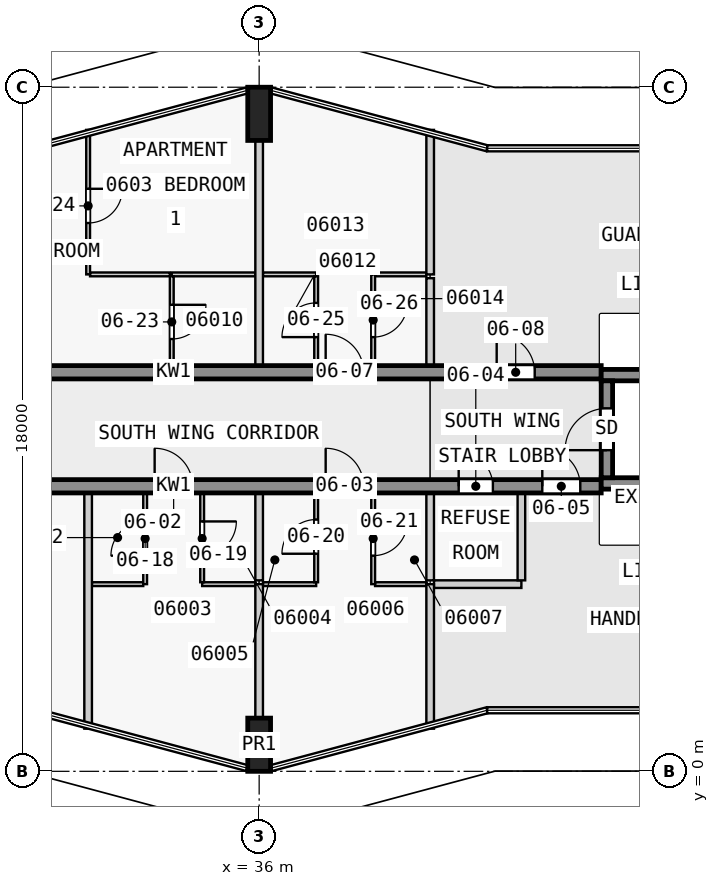
"""IFC4 building model, lengths in metres.
Left out: names, types, materials, properties, quantities, classifications, styles, units other than length and angle.
Written with IfcOpenShell. Run it as: python <this file> out.ifc"""

import sys

from ifc_helpers import new_model, si_unit, direction, frame, frame_2d, origin, origin_2d, place, context, subcontext, project, spatial, rectangle, extrude, element, fill, save


model = new_model("IFC4")
c1 = context("Model", 3, precision=1e-05, world=origin(), true_north=direction((0.0, 1.0)))
c2 = subcontext(c1, "Body", "Model", "MODEL_VIEW")
j1 = project(units=[si_unit("LENGTHUNIT", "METRE"), si_unit("PLANEANGLEUNIT", "RADIAN")], contexts=[c1])
p1 = place(None, origin())
s1 = spatial("IfcSite", under=j1, at=p1, CompositionType="ELEMENT")
p2 = place(p1, origin())
s2 = spatial("IfcBuilding", under=s1, at=p2, CompositionType="ELEMENT")
p3 = place(p2, frame((0.0, 0.0, 30.3)))
s3 = spatial("IfcBuildingStorey", under=s2, at=p3, CompositionType="ELEMENT", Elevation=30.3)
for number, where, z_axis, x_axis in (
    (1, (36.0, 0.7, 0.0), (0.0, 0.0, 1.0), (1.0, 0.0, 0.0)),
    (2, (36.0, 17.3, 0.0), (0.0, 0.0, 1.0), (1.0, 0.0, 0.0)),
):
    element("IfcColumn", number, at=place(p3, frame(where, z_axis=z_axis, x_axis=x_axis)), inside=s3, PredefinedType="COLUMN", context=c2, shape_type="SweptSolid", body=[
        extrude(rectangle(XDim=0.6, YDim=1.4, at=origin_2d()), origin(), (0.0, 0.0, 1.0), 3.5),
    ])
p4 = place(p3, frame((45.15, 7.725, 0.0), z_axis=(0.0, 0.0, 1.0), x_axis=(0.0, 1.0, 0.0)))
e3 = element("IfcWall", 3, at=p4, inside=s3, PredefinedType="SHEAR", context=c2, shape_type="SweptSolid", body=[
    extrude(rectangle(XDim=2.55, YDim=0.3, at=frame_2d((1.275, 0.0))), origin(), (0.0, 0.0, 1.0), 3.5),
])
p5 = place(p4, frame((0.725, 0.0, 0.0)))
e4 = element("IfcOpeningElement", 4, at=p5, cuts=e3, PredefinedType="OPENING", context=c2, shape_type="SweptSolid", body=[
    extrude(rectangle(XDim=1.1, YDim=2.1, at=frame_2d((0.55, 1.05))), frame((0.0, 0.16, 0.0), z_axis=(0.0, -1.0, 0.0), x_axis=(1.0, 0.0, 0.0)), (0.0, 0.0, 1.0), 0.32),
])
for number, where, z_axis, x_axis in (
    (5, (45.0, 7.575, 0.0), (0.0, 0.0, 1.0), (1.0, 0.0, 0.0)),
    (6, (45.0, 10.425, 0.0), (0.0, 0.0, 1.0), (1.0, 0.0, 0.0)),
):
    element("IfcWall", number, at=place(p3, frame(where, z_axis=z_axis, x_axis=x_axis)), inside=s3, PredefinedType="SHEAR", context=c2, shape_type="SweptSolid", body=[
        extrude(rectangle(XDim=7.2, YDim=0.3, at=frame_2d((3.6, 0.0))), origin(), (0.0, 0.0, 1.0), 3.5),
    ])
p6 = place(p3, frame((22.5, 7.5, 0.0), z_axis=(0.0, 0.0, 1.0), x_axis=(1.0, 0.0, 0.0)))
e7 = element("IfcWall", 7, at=p6, inside=s3, PredefinedType="SHEAR", context=c2, shape_type="SweptSolid", body=[
    extrude(rectangle(XDim=22.5, YDim=0.35, at=frame_2d((11.25, 0.0))), origin(), (0.0, 0.0, 1.0), 3.25),
])
p7 = place(p6, frame((4.05, 0.0, 0.0)))
e8 = element("IfcOpeningElement", 8, at=p7, cuts=e7, PredefinedType="OPENING", context=c2, shape_type="SweptSolid", body=[
    extrude(rectangle(XDim=1.0, YDim=2.1, at=frame_2d((0.5, 1.05))), frame((0.0, 0.185, 0.0), z_axis=(0.0, -1.0, 0.0), x_axis=(1.0, 0.0, 0.0)), (0.0, 0.0, 1.0), 0.37),
])
p8 = place(p6, frame((10.75, 0.0, 0.0)))
e9 = element("IfcOpeningElement", 9, at=p8, cuts=e7, PredefinedType="OPENING", context=c2, shape_type="SweptSolid", body=[
    extrude(rectangle(XDim=1.0, YDim=2.1, at=frame_2d((0.5, 1.05))), frame((0.0, 0.185, 0.0), z_axis=(0.0, -1.0, 0.0), x_axis=(1.0, 0.0, 0.0)), (0.0, 0.0, 1.0), 0.37),
])
p9 = place(p6, frame((15.25, 0.0, 0.0)))
e10 = element("IfcOpeningElement", 10, at=p9, cuts=e7, PredefinedType="OPENING", context=c2, shape_type="SweptSolid", body=[
    extrude(rectangle(XDim=1.0, YDim=2.1, at=frame_2d((0.5, 1.05))), frame((0.0, 0.185, 0.0), z_axis=(0.0, -1.0, 0.0), x_axis=(1.0, 0.0, 0.0)), (0.0, 0.0, 1.0), 0.37),
])
p10 = place(p6, frame((18.75, 0.0, 0.0)))
e11 = element("IfcOpeningElement", 11, at=p10, cuts=e7, PredefinedType="OPENING", context=c2, shape_type="SweptSolid", body=[
    extrude(rectangle(XDim=0.9, YDim=2.1, at=frame_2d((0.45, 1.05))), frame((0.0, 0.185, 0.0), z_axis=(0.0, -1.0, 0.0), x_axis=(1.0, 0.0, 0.0)), (0.0, 0.0, 1.0), 0.37),
])
p11 = place(p6, frame((20.95, 0.0, 0.0)))
e12 = element("IfcOpeningElement", 12, at=p11, cuts=e7, PredefinedType="OPENING", context=c2, shape_type="SweptSolid", body=[
    extrude(rectangle(XDim=1.0, YDim=2.1, at=frame_2d((0.5, 1.05))), frame((0.0, 0.185, 0.0), z_axis=(0.0, -1.0, 0.0), x_axis=(1.0, 0.0, 0.0)), (0.0, 0.0, 1.0), 0.37),
])
p12 = place(p3, frame((22.5, 10.5, 0.0), z_axis=(0.0, 0.0, 1.0), x_axis=(1.0, 0.0, 0.0)))
e13 = element("IfcWall", 13, at=p12, inside=s3, PredefinedType="SHEAR", context=c2, shape_type="SweptSolid", body=[
    extrude(rectangle(XDim=22.5, YDim=0.35, at=frame_2d((11.25, 0.0))), origin(), (0.0, 0.0, 1.0), 3.25),
])
p13 = place(p12, frame((6.05, 0.0, 0.0)))
e14 = element("IfcOpeningElement", 14, at=p13, cuts=e13, PredefinedType="OPENING", context=c2, shape_type="SweptSolid", body=[
    extrude(rectangle(XDim=1.0, YDim=2.1, at=frame_2d((0.5, 1.05))), frame((0.0, 0.185, 0.0), z_axis=(0.0, -1.0, 0.0), x_axis=(1.0, 0.0, 0.0)), (0.0, 0.0, 1.0), 0.37),
])
p14 = place(p12, frame((15.25, 0.0, 0.0)))
e15 = element("IfcOpeningElement", 15, at=p14, cuts=e13, PredefinedType="OPENING", context=c2, shape_type="SweptSolid", body=[
    extrude(rectangle(XDim=1.0, YDim=2.1, at=frame_2d((0.5, 1.05))), frame((0.0, 0.185, 0.0), z_axis=(0.0, -1.0, 0.0), x_axis=(1.0, 0.0, 0.0)), (0.0, 0.0, 1.0), 0.37),
])
p15 = place(p12, frame((19.75, 0.0, 0.0)))
e16 = element("IfcOpeningElement", 16, at=p15, cuts=e13, PredefinedType="OPENING", context=c2, shape_type="SweptSolid", body=[
    extrude(rectangle(XDim=1.0, YDim=2.1, at=frame_2d((0.5, 1.05))), frame((0.0, 0.185, 0.0), z_axis=(0.0, -1.0, 0.0), x_axis=(1.0, 0.0, 0.0)), (0.0, 0.0, 1.0), 0.37),
])
p16 = place(p3, frame((31.6, 4.925, 0.0), z_axis=(0.0, 0.0, 1.0), x_axis=(1.0, 0.0, 0.0)))
e17 = element("IfcWall", 17, at=p16, inside=s3, PredefinedType="PARTITIONING", context=c2, shape_type="SweptSolid", body=[
    extrude(rectangle(XDim=1.35, YDim=0.1, at=frame_2d((0.675, 0.0))), origin(), (0.0, 0.0, 1.0), 3.25),
])
for number, where, z_axis, x_axis in (
    (18, (34.5, 4.925, 0.0), (0.0, 0.0, 1.0), (1.0, 0.0, 0.0)),
    (19, (36.1, 4.925, 0.0), (0.0, 0.0, 1.0), (1.0, 0.0, 0.0)),
):
    element("IfcWall", number, at=place(p3, frame(where, z_axis=z_axis, x_axis=x_axis)), inside=s3, PredefinedType="PARTITIONING", context=c2, shape_type="SweptSolid", body=[
        extrude(rectangle(XDim=1.4, YDim=0.1, at=frame_2d((0.7, 0.0))), origin(), (0.0, 0.0, 1.0), 3.25),
    ])
p17 = place(p3, frame((39.05, 4.925, 0.0), z_axis=(0.0, 0.0, 1.0), x_axis=(1.0, 0.0, 0.0)))
e20 = element("IfcWall", 20, at=p17, inside=s3, PredefinedType="PARTITIONING", context=c2, shape_type="SweptSolid", body=[
    extrude(rectangle(XDim=1.35, YDim=0.1, at=frame_2d((0.675, 0.0))), origin(), (0.0, 0.0, 1.0), 3.25),
])
p18 = place(p3, frame((40.6, 4.925, 0.0), z_axis=(0.0, 0.0, 1.0), x_axis=(1.0, 0.0, 0.0)))
e21 = element("IfcWall", 21, at=p18, inside=s3, PredefinedType="PARTITIONING", context=c2, shape_type="SweptSolid", body=[
    extrude(rectangle(XDim=2.3, YDim=0.2, at=frame_2d((1.15, 0.0))), origin(), (0.0, 0.0, 1.0), 3.25),
])
p19 = place(p3, frame((35.9, 13.075, 0.0), z_axis=(0.0, 0.0, 1.0), x_axis=(-1.0, 0.0, 0.0)))
e22 = element("IfcWall", 22, at=p19, inside=s3, PredefinedType="PARTITIONING", context=c2, shape_type="SweptSolid", body=[
    extrude(rectangle(XDim=2.2, YDim=0.1, at=frame_2d((1.1, 0.0))), origin(), (0.0, 0.0, 1.0), 3.25),
])
p20 = place(p3, frame((37.5, 13.075, 0.0), z_axis=(0.0, 0.0, 1.0), x_axis=(-1.0, 0.0, 0.0)))
e23 = element("IfcWall", 23, at=p20, inside=s3, PredefinedType="PARTITIONING", context=c2, shape_type="SweptSolid", body=[
    extrude(rectangle(XDim=1.4, YDim=0.1, at=frame_2d((0.7, 0.0))), origin(), (0.0, 0.0, 1.0), 3.25),
])
p21 = place(p3, frame((40.4, 13.075, 0.0), z_axis=(0.0, 0.0, 1.0), x_axis=(-1.0, 0.0, 0.0)))
e24 = element("IfcWall", 24, at=p21, inside=s3, PredefinedType="PARTITIONING", context=c2, shape_type="SweptSolid", body=[
    extrude(rectangle(XDim=1.35, YDim=0.1, at=frame_2d((0.675, 0.0))), origin(), (0.0, 0.0, 1.0), 3.25),
])
p22 = place(p3, frame((31.55, 13.075, 0.0), z_axis=(0.0, 0.0, 1.0), x_axis=(1.0, 0.0, 0.0)))
e25 = element("IfcWall", 25, at=p22, inside=s3, PredefinedType="PARTITIONING", context=c2, shape_type="SweptSolid", body=[
    extrude(rectangle(XDim=2.1, YDim=0.1, at=frame_2d((1.05, 0.0))), origin(), (0.0, 0.0, 1.0), 3.25),
])
p23 = place(p3, frame((31.5, 16.878, 0.0), z_axis=(0.0, 0.0, 1.0), x_axis=(0.0, -1.0, 0.0)))
e26 = element("IfcWall", 26, at=p23, inside=s3, PredefinedType="PARTITIONING", context=c2, shape_type="SweptSolid", body=[
    extrude(rectangle(XDim=3.803, YDim=0.1, at=frame_2d((1.901, 0.0))), origin(), (0.0, 0.0, 1.0), 3.25),
])
p24 = place(p23, frame((1.55, 0.0, 0.0)))
e27 = element("IfcOpeningElement", 27, at=p24, cuts=e26, PredefinedType="OPENING", context=c2, shape_type="SweptSolid", body=[
    extrude(rectangle(XDim=0.9, YDim=2.1, at=frame_2d((0.45, 1.05))), frame((0.0, 0.06, 0.0), z_axis=(0.0, -1.0, 0.0), x_axis=(1.0, 0.0, 0.0)), (0.0, 0.0, 1.0), 0.12),
])
p25 = place(p3, frame((31.5, 1.122, 0.0), z_axis=(0.0, 0.0, 1.0), x_axis=(0.0, 1.0, 0.0)))
e28 = element("IfcWall", 28, at=p25, inside=s3, PredefinedType="PARTITIONING", context=c2, shape_type="SweptSolid", body=[
    extrude(rectangle(XDim=6.203, YDim=0.2, at=frame_2d((3.101, 0.0))), origin(), (0.0, 0.0, 1.0), 3.25),
])
p26 = place(p3, frame((33.0, 4.925, 0.0), z_axis=(0.0, 0.0, 1.0), x_axis=(0.0, 1.0, 0.0)))
e29 = element("IfcWall", 29, at=p26, inside=s3, PredefinedType="PARTITIONING", context=c2, shape_type="SweptSolid", body=[
    extrude(rectangle(XDim=2.4, YDim=0.1, at=frame_2d((1.2, 0.0))), origin(), (0.0, 0.0, 1.0), 3.25),
])
p27 = place(p26, frame((0.75, 0.0, 0.0)))
e30 = element("IfcOpeningElement", 30, at=p27, cuts=e29, PredefinedType="OPENING", context=c2, shape_type="SweptSolid", body=[
    extrude(rectangle(XDim=0.9, YDim=2.1, at=frame_2d((0.45, 1.05))), frame((0.0, 0.06, 0.0), z_axis=(0.0, -1.0, 0.0), x_axis=(1.0, 0.0, 0.0)), (0.0, 0.0, 1.0), 0.12),
])
p28 = place(p3, frame((33.7, 13.025, 0.0), z_axis=(0.0, 0.0, 1.0), x_axis=(0.0, -1.0, 0.0)))
e31 = element("IfcWall", 31, at=p28, inside=s3, PredefinedType="PARTITIONING", context=c2, shape_type="SweptSolid", body=[
    extrude(rectangle(XDim=2.35, YDim=0.1, at=frame_2d((1.175, 0.0))), origin(), (0.0, 0.0, 1.0), 3.25),
])
p29 = place(p28, frame((0.75, 0.0, 0.0)))
e32 = element("IfcOpeningElement", 32, at=p29, cuts=e31, PredefinedType="OPENING", context=c2, shape_type="SweptSolid", body=[
    extrude(rectangle(XDim=0.9, YDim=2.1, at=frame_2d((0.45, 1.05))), frame((0.0, 0.06, 0.0), z_axis=(0.0, -1.0, 0.0), x_axis=(1.0, 0.0, 0.0)), (0.0, 0.0, 1.0), 0.12),
])
p30 = place(p3, frame((34.5, 7.325, 0.0), z_axis=(0.0, 0.0, 1.0), x_axis=(0.0, -1.0, 0.0)))
e33 = element("IfcWall", 33, at=p30, inside=s3, PredefinedType="PARTITIONING", context=c2, shape_type="SweptSolid", body=[
    extrude(rectangle(XDim=2.35, YDim=0.1, at=frame_2d((1.175, 0.0))), origin(), (0.0, 0.0, 1.0), 3.25),
])
p31 = place(p30, frame((0.75, 0.0, 0.0)))
e34 = element("IfcOpeningElement", 34, at=p31, cuts=e33, PredefinedType="OPENING", context=c2, shape_type="SweptSolid", body=[
    extrude(rectangle(XDim=0.9, YDim=2.1, at=frame_2d((0.45, 1.05))), frame((0.0, 0.06, 0.0), z_axis=(0.0, -1.0, 0.0), x_axis=(1.0, 0.0, 0.0)), (0.0, 0.0, 1.0), 0.12),
])
p32 = place(p3, frame((36.0, 4.925, 0.0), z_axis=(0.0, 0.0, 1.0), x_axis=(0.0, -1.0, 0.0)))
e35 = element("IfcWall", 35, at=p32, inside=s3, PredefinedType="PARTITIONING", context=c2, shape_type="SweptSolid", body=[
    extrude(rectangle(XDim=3.525, YDim=0.2, at=frame_2d((1.763, 0.0))), origin(), (0.0, 0.0, 1.0), 3.25),
])
p33 = place(p3, frame((36.0, 5.025, 0.0), z_axis=(0.0, 0.0, 1.0), x_axis=(0.0, 1.0, 0.0)))
e36 = element("IfcWall", 36, at=p33, inside=s3, PredefinedType="PARTITIONING", context=c2, shape_type="SweptSolid", body=[
    extrude(rectangle(XDim=2.3, YDim=0.2, at=frame_2d((1.15, 0.0))), origin(), (0.0, 0.0, 1.0), 3.25),
])
p34 = place(p3, frame((36.0, 10.675, 0.0), z_axis=(0.0, 0.0, 1.0), x_axis=(0.0, 1.0, 0.0)))
e37 = element("IfcWall", 37, at=p34, inside=s3, PredefinedType="PARTITIONING", context=c2, shape_type="SweptSolid", body=[
    extrude(rectangle(XDim=5.925, YDim=0.2, at=frame_2d((2.962, 0.0))), origin(), (0.0, 0.0, 1.0), 3.25),
])
p35 = place(p3, frame((37.5, 4.975, 0.0), z_axis=(0.0, 0.0, 1.0), x_axis=(0.0, 1.0, 0.0)))
e38 = element("IfcWall", 38, at=p35, inside=s3, PredefinedType="PARTITIONING", context=c2, shape_type="SweptSolid", body=[
    extrude(rectangle(XDim=2.35, YDim=0.1, at=frame_2d((1.175, 0.0))), origin(), (0.0, 0.0, 1.0), 3.25),
])
p36 = place(p35, frame((0.75, 0.0, 0.0)))
e39 = element("IfcOpeningElement", 39, at=p36, cuts=e38, PredefinedType="OPENING", context=c2, shape_type="SweptSolid", body=[
    extrude(rectangle(XDim=0.9, YDim=2.1, at=frame_2d((0.45, 1.05))), frame((0.0, 0.06, 0.0), z_axis=(0.0, -1.0, 0.0), x_axis=(1.0, 0.0, 0.0)), (0.0, 0.0, 1.0), 0.12),
])
p37 = place(p3, frame((37.5, 10.675, 0.0), z_axis=(0.0, 0.0, 1.0), x_axis=(0.0, 1.0, 0.0)))
e40 = element("IfcWall", 40, at=p37, inside=s3, PredefinedType="PARTITIONING", context=c2, shape_type="SweptSolid", body=[
    extrude(rectangle(XDim=2.35, YDim=0.1, at=frame_2d((1.175, 0.0))), origin(), (0.0, 0.0, 1.0), 3.25),
])
p38 = place(p37, frame((0.75, 0.0, 0.0)))
e41 = element("IfcOpeningElement", 41, at=p38, cuts=e40, PredefinedType="OPENING", context=c2, shape_type="SweptSolid", body=[
    extrude(rectangle(XDim=0.9, YDim=2.1, at=frame_2d((0.45, 1.05))), frame((0.0, 0.06, 0.0), z_axis=(0.0, -1.0, 0.0), x_axis=(1.0, 0.0, 0.0)), (0.0, 0.0, 1.0), 0.12),
])
p39 = place(p3, frame((39.0, 7.325, 0.0), z_axis=(0.0, 0.0, 1.0), x_axis=(0.0, -1.0, 0.0)))
e42 = element("IfcWall", 42, at=p39, inside=s3, PredefinedType="PARTITIONING", context=c2, shape_type="SweptSolid", body=[
    extrude(rectangle(XDim=2.4, YDim=0.1, at=frame_2d((1.2, 0.0))), origin(), (0.0, 0.0, 1.0), 3.25),
])
p40 = place(p39, frame((0.75, 0.0, 0.0)))
e43 = element("IfcOpeningElement", 43, at=p40, cuts=e42, PredefinedType="OPENING", context=c2, shape_type="SweptSolid", body=[
    extrude(rectangle(XDim=0.9, YDim=2.1, at=frame_2d((0.45, 1.05))), frame((0.0, 0.06, 0.0), z_axis=(0.0, -1.0, 0.0), x_axis=(1.0, 0.0, 0.0)), (0.0, 0.0, 1.0), 0.12),
])
p41 = place(p3, frame((39.0, 13.075, 0.0), z_axis=(0.0, 0.0, 1.0), x_axis=(0.0, -1.0, 0.0)))
e44 = element("IfcWall", 44, at=p41, inside=s3, PredefinedType="PARTITIONING", context=c2, shape_type="SweptSolid", body=[
    extrude(rectangle(XDim=2.4, YDim=0.1, at=frame_2d((1.2, 0.0))), origin(), (0.0, 0.0, 1.0), 3.25),
])
p42 = place(p41, frame((0.75, 0.0, 0.0)))
e45 = element("IfcOpeningElement", 45, at=p42, cuts=e44, PredefinedType="OPENING", context=c2, shape_type="SweptSolid", body=[
    extrude(rectangle(XDim=0.9, YDim=2.1, at=frame_2d((0.45, 1.05))), frame((0.0, 0.06, 0.0), z_axis=(0.0, -1.0, 0.0), x_axis=(1.0, 0.0, 0.0)), (0.0, 0.0, 1.0), 0.12),
])
for number, where, z_axis, x_axis in (
    (46, (40.5, 4.925, 0.0), (0.0, 0.0, 1.0), (0.0, -1.0, 0.0)),
    (47, (40.5, 16.878, 0.0), (0.0, 0.0, 1.0), (0.0, -1.0, 0.0)),
):
    element("IfcWall", number, at=place(p3, frame(where, z_axis=z_axis, x_axis=x_axis)), inside=s3, PredefinedType="PARTITIONING", context=c2, shape_type="SweptSolid", body=[
        extrude(rectangle(XDim=3.803, YDim=0.2, at=frame_2d((1.901, 0.0))), origin(), (0.0, 0.0, 1.0), 3.25),
    ])
for number, where, z_axis, x_axis in (
    (48, (40.5, 5.025, 0.0), (0.0, 0.0, 1.0), (0.0, 1.0, 0.0)),
    (49, (40.5, 10.675, 0.0), (0.0, 0.0, 1.0), (0.0, 1.0, 0.0)),
    (50, (42.9, 5.025, 0.0), (0.0, 0.0, 1.0), (0.0, 1.0, 0.0)),
):
    element("IfcWall", number, at=place(p3, frame(where, z_axis=z_axis, x_axis=x_axis)), inside=s3, PredefinedType="PARTITIONING", context=c2, shape_type="SweptSolid", body=[
        extrude(rectangle(XDim=2.3, YDim=0.2, at=frame_2d((1.15, 0.0))), origin(), (0.0, 0.0, 1.0), 3.25),
    ])
p43 = place(p5, origin())
e51 = element("IfcDoor", 51, at=p43, inside=s3, OperationType="SINGLE_SWING_LEFT", PredefinedType="DOOR", context=c2, shape_type="SweptSolid", body=[
    extrude(rectangle(XDim=1.1, YDim=2.1, at=frame_2d((0.55, 1.05))), frame((0.0, 0.025, 0.0), z_axis=(0.0, -1.0, 0.0), x_axis=(1.0, 0.0, 0.0)), (0.0, 0.0, 1.0), 0.05),
])
fill(e4, e51)
p44 = place(p8, origin())
e52 = element("IfcDoor", 52, at=p44, inside=s3, OperationType="SINGLE_SWING_LEFT", PredefinedType="DOOR", context=c2, shape_type="SweptSolid", body=[
    extrude(rectangle(XDim=1.0, YDim=2.1, at=frame_2d((0.5, 1.05))), frame((0.0, 0.025, 0.0), z_axis=(0.0, -1.0, 0.0), x_axis=(1.0, 0.0, 0.0)), (0.0, 0.0, 1.0), 0.05),
])
fill(e9, e52)
p45 = place(p9, origin())
e53 = element("IfcDoor", 53, at=p45, inside=s3, OperationType="SINGLE_SWING_RIGHT", PredefinedType="DOOR", context=c2, shape_type="SweptSolid", body=[
    extrude(rectangle(XDim=1.0, YDim=2.1, at=frame_2d((0.5, 1.05))), frame((0.0, 0.025, 0.0), z_axis=(0.0, -1.0, 0.0), x_axis=(1.0, 0.0, 0.0)), (0.0, 0.0, 1.0), 0.05),
])
fill(e10, e53)
p46 = place(p10, origin())
e54 = element("IfcDoor", 54, at=p46, inside=s3, OperationType="SINGLE_SWING_RIGHT", PredefinedType="DOOR", context=c2, shape_type="SweptSolid", body=[
    extrude(rectangle(XDim=0.9, YDim=2.1, at=frame_2d((0.45, 1.05))), frame((0.0, 0.025, 0.0), z_axis=(0.0, -1.0, 0.0), x_axis=(1.0, 0.0, 0.0)), (0.0, 0.0, 1.0), 0.05),
])
fill(e11, e54)
p47 = place(p11, origin())
e55 = element("IfcDoor", 55, at=p47, inside=s3, OperationType="SINGLE_SWING_RIGHT", PredefinedType="DOOR", context=c2, shape_type="SweptSolid", body=[
    extrude(rectangle(XDim=1.0, YDim=2.1, at=frame_2d((0.5, 1.05))), frame((0.0, 0.025, 0.0), z_axis=(0.0, -1.0, 0.0), x_axis=(1.0, 0.0, 0.0)), (0.0, 0.0, 1.0), 0.05),
])
fill(e12, e55)
p48 = place(p14, origin())
e56 = element("IfcDoor", 56, at=p48, inside=s3, OperationType="SINGLE_SWING_RIGHT", PredefinedType="DOOR", context=c2, shape_type="SweptSolid", body=[
    extrude(rectangle(XDim=1.0, YDim=2.1, at=frame_2d((0.5, 1.05))), frame((0.0, 0.025, 0.0), z_axis=(0.0, -1.0, 0.0), x_axis=(1.0, 0.0, 0.0)), (0.0, 0.0, 1.0), 0.05),
])
fill(e15, e56)
p49 = place(p15, origin())
e57 = element("IfcDoor", 57, at=p49, inside=s3, OperationType="SINGLE_SWING_RIGHT", PredefinedType="DOOR", context=c2, shape_type="SweptSolid", body=[
    extrude(rectangle(XDim=1.0, YDim=2.1, at=frame_2d((0.5, 1.05))), frame((0.0, 0.025, 0.0), z_axis=(0.0, -1.0, 0.0), x_axis=(1.0, 0.0, 0.0)), (0.0, 0.0, 1.0), 0.05),
])
fill(e16, e57)
p50 = place(p27, origin())
e58 = element("IfcDoor", 58, at=p50, inside=s3, OperationType="SINGLE_SWING_LEFT", PredefinedType="DOOR", context=c2, shape_type="SweptSolid", body=[
    extrude(rectangle(XDim=0.9, YDim=2.1, at=frame_2d((0.45, 1.05))), frame((0.0, 0.025, 0.0), z_axis=(0.0, -1.0, 0.0), x_axis=(1.0, 0.0, 0.0)), (0.0, 0.0, 1.0), 0.05),
])
fill(e30, e58)
p51 = place(p31, origin())
e59 = element("IfcDoor", 59, at=p51, inside=s3, OperationType="SINGLE_SWING_RIGHT", PredefinedType="DOOR", context=c2, shape_type="SweptSolid", body=[
    extrude(rectangle(XDim=0.9, YDim=2.1, at=frame_2d((0.45, 1.05))), frame((0.0, 0.025, 0.0), z_axis=(0.0, -1.0, 0.0), x_axis=(1.0, 0.0, 0.0)), (0.0, 0.0, 1.0), 0.05),
])
fill(e34, e59)
p52 = place(p36, origin())
e60 = element("IfcDoor", 60, at=p52, inside=s3, OperationType="SINGLE_SWING_RIGHT", PredefinedType="DOOR", context=c2, shape_type="SweptSolid", body=[
    extrude(rectangle(XDim=0.9, YDim=2.1, at=frame_2d((0.45, 1.05))), frame((0.0, 0.025, 0.0), z_axis=(0.0, -1.0, 0.0), x_axis=(1.0, 0.0, 0.0)), (0.0, 0.0, 1.0), 0.05),
])
fill(e39, e60)
p53 = place(p40, origin())
e61 = element("IfcDoor", 61, at=p53, inside=s3, OperationType="SINGLE_SWING_LEFT", PredefinedType="DOOR", context=c2, shape_type="SweptSolid", body=[
    extrude(rectangle(XDim=0.9, YDim=2.1, at=frame_2d((0.45, 1.05))), frame((0.0, 0.025, 0.0), z_axis=(0.0, -1.0, 0.0), x_axis=(1.0, 0.0, 0.0)), (0.0, 0.0, 1.0), 0.05),
])
fill(e43, e61)
p54 = place(p29, origin())
e62 = element("IfcDoor", 62, at=p54, inside=s3, OperationType="SINGLE_SWING_RIGHT", PredefinedType="DOOR", context=c2, shape_type="SweptSolid", body=[
    extrude(rectangle(XDim=0.9, YDim=2.1, at=frame_2d((0.45, 1.05))), frame((0.0, 0.025, 0.0), z_axis=(0.0, -1.0, 0.0), x_axis=(1.0, 0.0, 0.0)), (0.0, 0.0, 1.0), 0.05),
])
fill(e32, e62)
p55 = place(p24, origin())
e63 = element("IfcDoor", 63, at=p55, inside=s3, OperationType="SINGLE_SWING_RIGHT", PredefinedType="DOOR", context=c2, shape_type="SweptSolid", body=[
    extrude(rectangle(XDim=0.9, YDim=2.1, at=frame_2d((0.45, 1.05))), frame((0.0, 0.025, 0.0), z_axis=(0.0, -1.0, 0.0), x_axis=(1.0, 0.0, 0.0)), (0.0, 0.0, 1.0), 0.05),
])
fill(e27, e63)
p56 = place(p38, origin())
e64 = element("IfcDoor", 64, at=p56, inside=s3, OperationType="SINGLE_SWING_RIGHT", PredefinedType="DOOR", context=c2, shape_type="SweptSolid", body=[
    extrude(rectangle(XDim=0.9, YDim=2.1, at=frame_2d((0.45, 1.05))), frame((0.0, 0.025, 0.0), z_axis=(0.0, -1.0, 0.0), x_axis=(1.0, 0.0, 0.0)), (0.0, 0.0, 1.0), 0.05),
])
fill(e41, e64)
p57 = place(p42, origin())
e65 = element("IfcDoor", 65, at=p57, inside=s3, OperationType="SINGLE_SWING_RIGHT", PredefinedType="DOOR", context=c2, shape_type="SweptSolid", body=[
    extrude(rectangle(XDim=0.9, YDim=2.1, at=frame_2d((0.45, 1.05))), frame((0.0, 0.025, 0.0), z_axis=(0.0, -1.0, 0.0), x_axis=(1.0, 0.0, 0.0)), (0.0, 0.0, 1.0), 0.05),
])
fill(e45, e65)
save(model, sys.argv[1])
